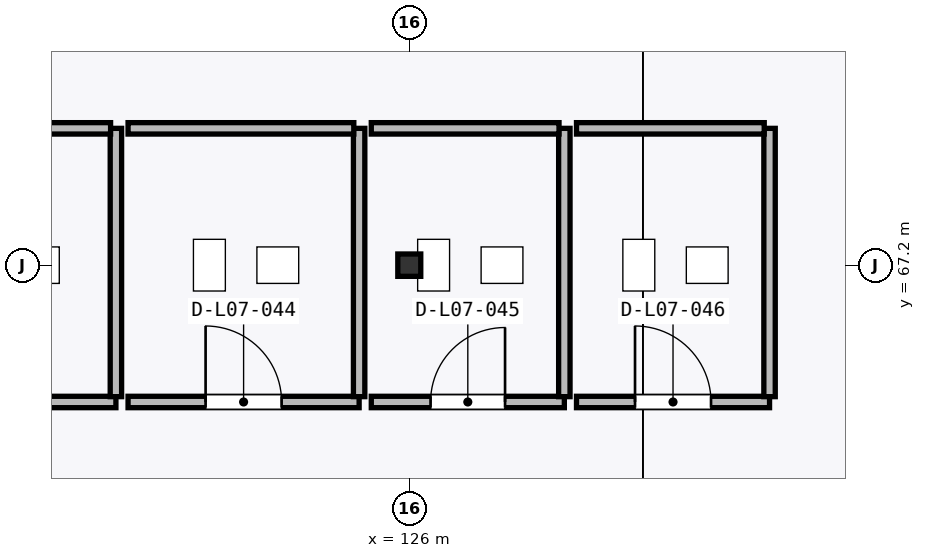
"""IFC4 building model, lengths in metres.
Left out: names, types, materials, properties, quantities, classifications, styles, units other than length and angle.
Written with IfcOpenShell. Run it as: python <this file> out.ifc"""

import sys

from ifc_helpers import new_model, si_unit, direction, frame, frame_2d, origin, origin_2d, place, context, subcontext, project, spatial, rectangle, i_section, extrude, element, fill, save


model = new_model("IFC4")
c1 = context("Model", 3, precision=1e-05, world=origin(), true_north=direction((0.0, 1.0)))
c2 = subcontext(c1, "Body", "Model", "MODEL_VIEW")
j1 = project(units=[si_unit("LENGTHUNIT", "METRE"), si_unit("PLANEANGLEUNIT", "RADIAN")], contexts=[c1])
p1 = place(None, origin())
s1 = spatial("IfcSite", under=j1, at=p1, CompositionType="ELEMENT")
p2 = place(p1, origin())
s2 = spatial("IfcBuilding", under=s1, at=p2, CompositionType="ELEMENT")
p3 = place(p2, frame((0.0, 0.0, 31.8)))
s3 = spatial("IfcBuildingStorey", under=s2, at=p3, CompositionType="ELEMENT", Elevation=31.8)
p4 = place(p3, frame((126.0, 67.2, 0.0), z_axis=(0.0, 0.0, 1.0), x_axis=(1.0, 0.0, 0.0)))
e1 = element("IfcColumn", 1, at=p4, inside=s3, PredefinedType="COLUMN", context=c2, shape_type="SweptSolid", body=[
    extrude(i_section(OverallWidth=0.302, OverallDepth=0.294, WebThickness=0.012, FlangeThickness=0.012, FilletRadius=0.018, at=origin_2d()), origin(), (0.0, 0.0, 1.0), 4.5),
])
p5 = place(p3, frame((119.2, 65.4, 0.0), z_axis=(0.0, 0.0, 1.0), x_axis=(1.0, 0.0, 0.0)))
e2 = element("IfcWall", 2, at=p5, inside=s3, PredefinedType="PARTITIONING", context=c2, shape_type="SweptSolid", body=[
    extrude(rectangle(XDim=2.94, YDim=0.15, at=frame_2d((1.47, 0.0))), origin(), (0.0, 0.0, 1.0), 4.245),
])
p6 = place(p5, frame((0.97, 0.0, 0.0)))
e3 = element("IfcOpeningElement", 3, at=p6, cuts=e2, PredefinedType="OPENING", context=c2, shape_type="SweptSolid", body=[
    extrude(rectangle(XDim=1.0, YDim=2.1, at=frame_2d((0.5, 1.05))), frame((0.0, 0.085, 0.0), z_axis=(0.0, -1.0, 0.0), x_axis=(1.0, 0.0, 0.0)), (0.0, 0.0, 1.0), 0.17),
])
p7 = place(p3, frame((122.14, 65.47, 0.0), z_axis=(0.0, 0.0, 1.0), x_axis=(0.0, 1.0, 0.0)))
e4 = element("IfcWall", 4, at=p7, inside=s3, PredefinedType="PARTITIONING", context=c2, shape_type="SweptSolid", body=[
    extrude(rectangle(XDim=3.53, YDim=0.15, at=frame_2d((1.765, 0.0))), origin(), (0.0, 0.0, 1.0), 4.245),
])
p8 = place(p3, frame((122.07, 69.0, 0.0), z_axis=(0.0, 0.0, 1.0), x_axis=(-1.0, 0.0, 0.0)))
e5 = element("IfcWall", 5, at=p8, inside=s3, PredefinedType="PARTITIONING", context=c2, shape_type="SweptSolid", body=[
    extrude(rectangle(XDim=2.87, YDim=0.15, at=frame_2d((1.435, 0.0))), origin(), (0.0, 0.0, 1.0), 4.245),
])
p9 = place(p3, frame((122.3, 65.4, 0.0), z_axis=(0.0, 0.0, 1.0), x_axis=(1.0, 0.0, 0.0)))
e6 = element("IfcWall", 6, at=p9, inside=s3, PredefinedType="PARTITIONING", context=c2, shape_type="SweptSolid", body=[
    extrude(rectangle(XDim=3.04, YDim=0.15, at=frame_2d((1.52, 0.0))), origin(), (0.0, 0.0, 1.0), 4.245),
])
p10 = place(p9, frame((1.02, 0.0, 0.0)))
e7 = element("IfcOpeningElement", 7, at=p10, cuts=e6, PredefinedType="OPENING", context=c2, shape_type="SweptSolid", body=[
    extrude(rectangle(XDim=1.0, YDim=2.1, at=frame_2d((0.5, 1.05))), frame((0.0, 0.085, 0.0), z_axis=(0.0, -1.0, 0.0), x_axis=(1.0, 0.0, 0.0)), (0.0, 0.0, 1.0), 0.17),
])
p11 = place(p3, frame((125.34, 65.47, 0.0), z_axis=(0.0, 0.0, 1.0), x_axis=(0.0, 1.0, 0.0)))
e8 = element("IfcWall", 8, at=p11, inside=s3, PredefinedType="PARTITIONING", context=c2, shape_type="SweptSolid", body=[
    extrude(rectangle(XDim=3.53, YDim=0.15, at=frame_2d((1.765, 0.0))), origin(), (0.0, 0.0, 1.0), 4.245),
])
p12 = place(p3, frame((125.27, 69.0, 0.0), z_axis=(0.0, 0.0, 1.0), x_axis=(-1.0, 0.0, 0.0)))
e9 = element("IfcWall", 9, at=p12, inside=s3, PredefinedType="PARTITIONING", context=c2, shape_type="SweptSolid", body=[
    extrude(rectangle(XDim=2.97, YDim=0.15, at=frame_2d((1.485, 0.0))), origin(), (0.0, 0.0, 1.0), 4.245),
])
p13 = place(p3, frame((125.5, 65.4, 0.0), z_axis=(0.0, 0.0, 1.0), x_axis=(1.0, 0.0, 0.0)))
e10 = element("IfcWall", 10, at=p13, inside=s3, PredefinedType="PARTITIONING", context=c2, shape_type="SweptSolid", body=[
    extrude(rectangle(XDim=2.54, YDim=0.15, at=frame_2d((1.27, 0.0))), origin(), (0.0, 0.0, 1.0), 4.245),
])
p14 = place(p13, frame((0.78, 0.0, 0.0)))
e11 = element("IfcOpeningElement", 11, at=p14, cuts=e10, PredefinedType="OPENING", context=c2, shape_type="SweptSolid", body=[
    extrude(rectangle(XDim=0.98, YDim=2.1, at=frame_2d((0.49, 1.05))), frame((0.0, 0.085, 0.0), z_axis=(0.0, -1.0, 0.0), x_axis=(1.0, 0.0, 0.0)), (0.0, 0.0, 1.0), 0.17),
])
p15 = place(p3, frame((128.04, 65.47, 0.0), z_axis=(0.0, 0.0, 1.0), x_axis=(0.0, 1.0, 0.0)))
e12 = element("IfcWall", 12, at=p15, inside=s3, PredefinedType="PARTITIONING", context=c2, shape_type="SweptSolid", body=[
    extrude(rectangle(XDim=3.53, YDim=0.15, at=frame_2d((1.765, 0.0))), origin(), (0.0, 0.0, 1.0), 4.245),
])
p16 = place(p3, frame((127.97, 69.0, 0.0), z_axis=(0.0, 0.0, 1.0), x_axis=(-1.0, 0.0, 0.0)))
e13 = element("IfcWall", 13, at=p16, inside=s3, PredefinedType="PARTITIONING", context=c2, shape_type="SweptSolid", body=[
    extrude(rectangle(XDim=2.47, YDim=0.15, at=frame_2d((1.235, 0.0))), origin(), (0.0, 0.0, 1.0), 4.245),
])
p17 = place(p3, frame((128.2, 65.4, 0.0), z_axis=(0.0, 0.0, 1.0), x_axis=(1.0, 0.0, 0.0)))
e14 = element("IfcWall", 14, at=p17, inside=s3, PredefinedType="PARTITIONING", context=c2, shape_type="SweptSolid", body=[
    extrude(rectangle(XDim=2.54, YDim=0.15, at=frame_2d((1.27, 0.0))), origin(), (0.0, 0.0, 1.0), 4.245),
])
p18 = place(p17, frame((0.77, 0.0, 0.0)))
e15 = element("IfcOpeningElement", 15, at=p18, cuts=e14, PredefinedType="OPENING", context=c2, shape_type="SweptSolid", body=[
    extrude(rectangle(XDim=1.0, YDim=2.1, at=frame_2d((0.5, 1.05))), frame((0.0, 0.085, 0.0), z_axis=(0.0, -1.0, 0.0), x_axis=(1.0, 0.0, 0.0)), (0.0, 0.0, 1.0), 0.17),
])
p19 = place(p3, frame((130.74, 65.47, 0.0), z_axis=(0.0, 0.0, 1.0), x_axis=(0.0, 1.0, 0.0)))
e16 = element("IfcWall", 16, at=p19, inside=s3, PredefinedType="PARTITIONING", context=c2, shape_type="SweptSolid", body=[
    extrude(rectangle(XDim=3.53, YDim=0.15, at=frame_2d((1.765, 0.0))), origin(), (0.0, 0.0, 1.0), 4.245),
])
p20 = place(p3, frame((130.67, 69.0, 0.0), z_axis=(0.0, 0.0, 1.0), x_axis=(-1.0, 0.0, 0.0)))
e17 = element("IfcWall", 17, at=p20, inside=s3, PredefinedType="PARTITIONING", context=c2, shape_type="SweptSolid", body=[
    extrude(rectangle(XDim=2.47, YDim=0.15, at=frame_2d((1.235, 0.0))), origin(), (0.0, 0.0, 1.0), 4.245),
])
p21 = place(p10, origin())
e18 = element("IfcDoor", 18, at=p21, inside=s3, OperationType="SINGLE_SWING_LEFT", PredefinedType="DOOR", context=c2, shape_type="SweptSolid", body=[
    extrude(rectangle(XDim=1.0, YDim=2.1, at=frame_2d((0.5, 1.05))), frame((0.0, 0.025, 0.0), z_axis=(0.0, -1.0, 0.0), x_axis=(1.0, 0.0, 0.0)), (0.0, 0.0, 1.0), 0.05),
])
fill(e7, e18)
p22 = place(p14, origin())
e19 = element("IfcDoor", 19, at=p22, inside=s3, OperationType="SINGLE_SWING_RIGHT", PredefinedType="DOOR", context=c2, shape_type="SweptSolid", body=[
    extrude(rectangle(XDim=0.98, YDim=2.1, at=frame_2d((0.49, 1.05))), frame((0.0, 0.025, 0.0), z_axis=(0.0, -1.0, 0.0), x_axis=(1.0, 0.0, 0.0)), (0.0, 0.0, 1.0), 0.05),
])
fill(e11, e19)
p23 = place(p18, origin())
e20 = element("IfcDoor", 20, at=p23, inside=s3, OperationType="SINGLE_SWING_LEFT", PredefinedType="DOOR", context=c2, shape_type="SweptSolid", body=[
    extrude(rectangle(XDim=1.0, YDim=2.1, at=frame_2d((0.5, 1.05))), frame((0.0, 0.025, 0.0), z_axis=(0.0, -1.0, 0.0), x_axis=(1.0, 0.0, 0.0)), (0.0, 0.0, 1.0), 0.05),
])
fill(e15, e20)
save(model, sys.argv[1])
